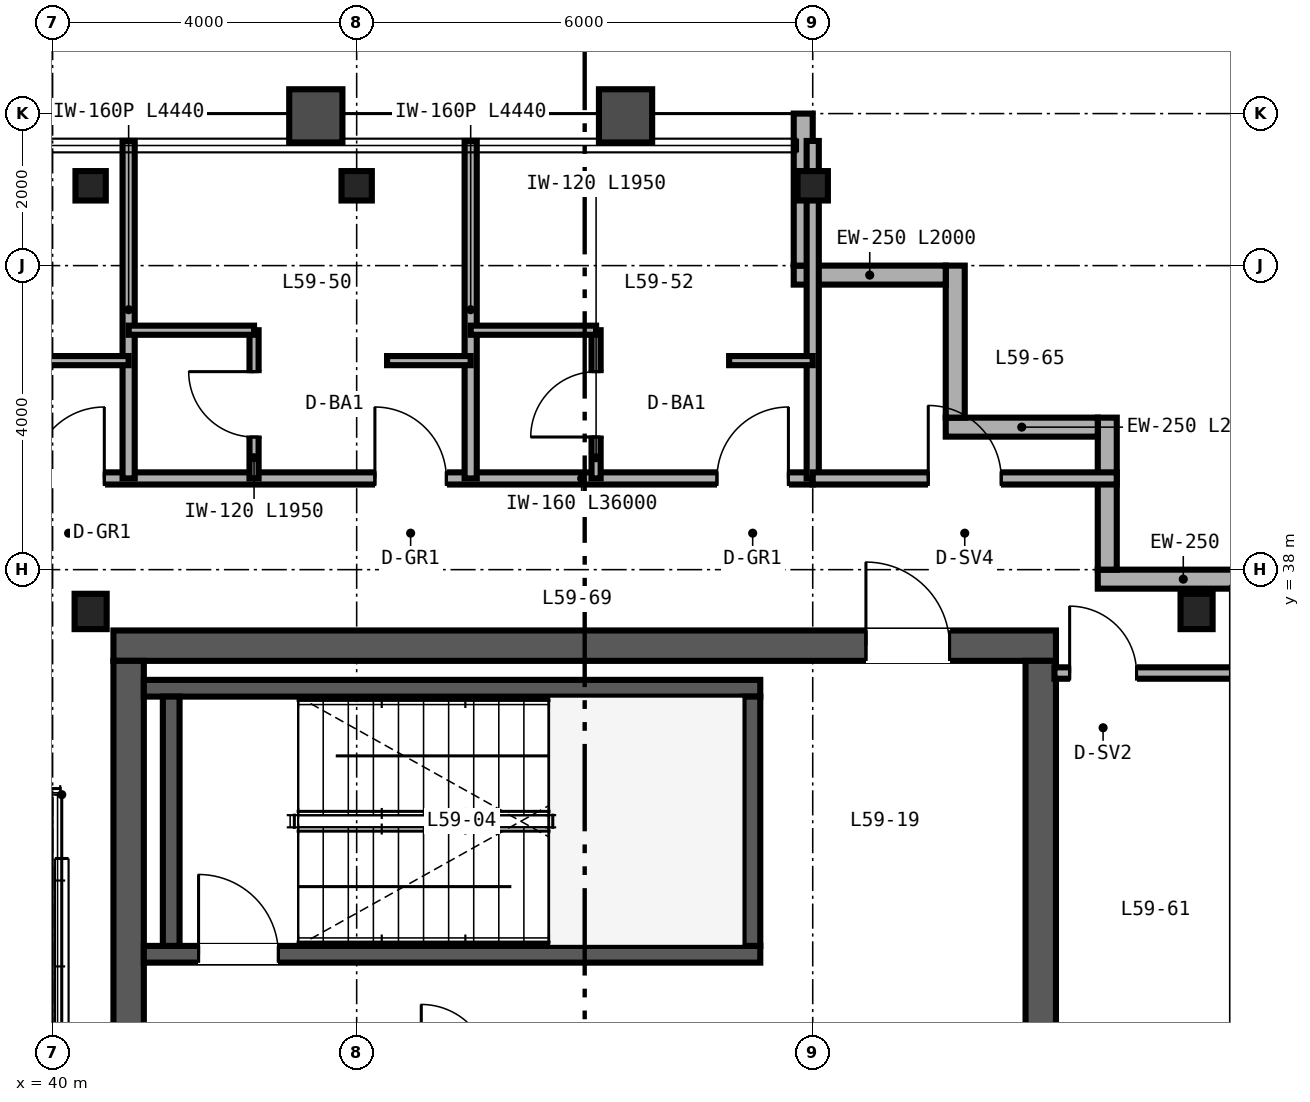
"""IFC4 building model, lengths in metres.
Left out: names, types, materials, properties, quantities, classifications, styles, units other than length and angle.
Written with IfcOpenShell. Run it as: python <this file> out.ifc"""

import sys

from ifc_helpers import new_model, si_unit, direction, frame, frame_2d, origin, origin_2d, place, context, subcontext, project, spatial, rectangle, i_section, extrude, source, transform, mapped, element, fill, save


model = new_model("IFC4")
c1 = context("Model", 3, precision=1e-05, world=origin(), true_north=direction((0.0, 1.0)))
c2 = subcontext(c1, "Body", "Model", "MODEL_VIEW")
j1 = project(units=[si_unit("LENGTHUNIT", "METRE"), si_unit("PLANEANGLEUNIT", "RADIAN")], contexts=[c1])
p1 = place(None, origin())
s1 = spatial("IfcSite", under=j1, at=p1, CompositionType="ELEMENT")
p2 = place(p1, origin())
s2 = spatial("IfcBuilding", under=s1, at=p2, CompositionType="ELEMENT")
p3 = place(p2, frame((0.0, 0.0, 236.4)))
s3 = spatial("IfcBuildingStorey", under=s2, at=p3, CompositionType="ELEMENT", Elevation=236.4)
p4 = place(p3, frame((40.8, 37.0, 0.0), z_axis=(0.0, 0.0, 1.0), x_axis=(1.0, 0.0, 0.0)))
e1 = element("IfcWall", 1, at=p4, inside=s3, PredefinedType="SHEAR", context=c2, shape_type="SweptSolid", body=[
    extrude(rectangle(XDim=12.4, YDim=0.4, at=frame_2d((6.2, 0.0))), origin(), (0.0, 0.0, 1.0), 3.38),
])
p5 = place(p4, frame((9.9, 0.0, 0.0)))
e2 = element("IfcOpeningElement", 2, at=p5, cuts=e1, PredefinedType="OPENING", context=c2, shape_type="SweptSolid", body=[
    extrude(rectangle(XDim=1.1, YDim=2.15, at=frame_2d((0.55, 1.075))), frame((0.0, 0.21, 0.0), z_axis=(0.0, -1.0, 0.0), x_axis=(1.0, 0.0, 0.0)), (0.0, 0.0, 1.0), 0.42),
])
for number, where, z_axis, x_axis in (
    (3, (41.0, 15.2, 0.0), (0.0, 0.0, 1.0), (0.0, 1.0, 0.0)),
    (4, (53.0, 15.2, 0.0), (0.0, 0.0, 1.0), (0.0, 1.0, 0.0)),
):
    element("IfcWall", number, at=place(p3, frame(where, z_axis=z_axis, x_axis=x_axis)), inside=s3, PredefinedType="SHEAR", context=c2, shape_type="SweptSolid", body=[
        extrude(rectangle(XDim=21.6, YDim=0.4, at=frame_2d((10.8, 0.0))), origin(), (0.0, 0.0, 1.0), 3.38),
    ])
p6 = place(p3, frame((41.2, 32.94, 0.0), z_axis=(0.0, 0.0, 1.0), x_axis=(1.0, 0.0, 0.0)))
e5 = element("IfcWall", 5, at=p6, inside=s3, PredefinedType="SHEAR", context=c2, shape_type="SweptSolid", body=[
    extrude(rectangle(XDim=8.11, YDim=0.22, at=frame_2d((4.055, 0.0))), origin(), (0.0, 0.0, 1.0), 3.4),
])
p7 = place(p6, frame((0.72, 0.0, 0.0)))
e6 = element("IfcOpeningElement", 6, at=p7, cuts=e5, PredefinedType="OPENING", context=c2, shape_type="SweptSolid", body=[
    extrude(rectangle(XDim=1.05, YDim=2.15, at=frame_2d((0.525, 1.075))), frame((0.0, 0.12, 0.0), z_axis=(0.0, -1.0, 0.0), x_axis=(1.0, 0.0, 0.0)), (0.0, 0.0, 1.0), 0.24),
])
p8 = place(p3, frame((41.2, 36.44, 0.0), z_axis=(0.0, 0.0, 1.0), x_axis=(1.0, 0.0, 0.0)))
e7 = element("IfcWall", 7, at=p8, inside=s3, PredefinedType="SHEAR", context=c2, shape_type="SweptSolid", body=[
    extrude(rectangle(XDim=8.11, YDim=0.22, at=frame_2d((4.055, 0.0))), origin(), (0.0, 0.0, 1.0), 3.4),
])
for number, where, z_axis, x_axis in (
    (8, (41.56, 33.05, 0.0), (0.0, 0.0, 1.0), (0.0, 1.0, 0.0)),
    (9, (49.2, 33.05, 0.0), (0.0, 0.0, 1.0), (0.0, 1.0, 0.0)),
):
    element("IfcWall", number, at=place(p3, frame(where, z_axis=z_axis, x_axis=x_axis)), inside=s3, PredefinedType="SHEAR", context=c2, shape_type="SweptSolid", body=[
        extrude(rectangle(XDim=3.28, YDim=0.22, at=frame_2d((1.64, 0.0))), origin(), (0.0, 0.0, 1.0), 3.4),
    ])
m1 = source(origin(), c2, "Body", "SweptSolid", [
    extrude(i_section(OverallWidth=0.422, OverallDepth=0.465, WebThickness=0.045, FlangeThickness=0.073, FilletRadius=0.025, at=origin_2d()), origin(), (0.0, 0.0, 1.0), 3.38),
])
for number, where, z_axis, x_axis in (
    (10, (40.5, 37.45, 0.0), (0.0, 0.0, 1.0), (1.0, 0.0, 0.0)),
    (11, (55.05, 37.45, 0.0), (0.0, 0.0, 1.0), (1.0, 0.0, 0.0)),
):
    element("IfcColumn", number, at=place(p3, frame(where, z_axis=z_axis, x_axis=x_axis)), inside=s3, PredefinedType="COLUMN", context=c2, shape_type="MappedRepresentation", body=[
        mapped(m1, transform((0.0, 0.0, 0.0), scale=1.0)),
    ])
m2 = source(origin(), c2, "Body", "SweptSolid", [
    extrude(i_section(OverallWidth=0.399, OverallDepth=0.387, WebThickness=0.021, FlangeThickness=0.033, FilletRadius=0.025, at=origin_2d()), origin(), (0.0, 0.0, 1.0), 3.38),
])
for number, where, z_axis, x_axis in (
    (12, (40.5, 43.05, 0.0), (0.0, 0.0, 1.0), (1.0, 0.0, 0.0)),
    (13, (44.0, 43.05, 0.0), (0.0, 0.0, 1.0), (1.0, 0.0, 0.0)),
    (14, (50.0, 43.05, 0.0), (0.0, 0.0, 1.0), (1.0, 0.0, 0.0)),
):
    element("IfcColumn", number, at=place(p3, frame(where, z_axis=z_axis, x_axis=x_axis)), inside=s3, PredefinedType="COLUMN", context=c2, shape_type="MappedRepresentation", body=[
        mapped(m2, transform((0.0, 0.0, 0.0), scale=1.0)),
    ])
p9 = place(p3, frame((56.0, 37.875, 0.0), z_axis=(0.0, 0.0, 1.0), x_axis=(-1.0, 0.0, 0.0)))
e15 = element("IfcWall", 15, at=p9, inside=s3, PredefinedType="SOLIDWALL", context=c2, shape_type="SweptSolid", body=[
    extrude(rectangle(XDim=2.25, YDim=0.25, at=frame_2d((1.125, 0.0))), origin(), (0.0, 0.0, 1.0), 3.38),
])
for number, where, z_axis, x_axis in (
    (16, (53.875, 38.0, 0.0), (0.0, 0.0, 1.0), (0.0, 1.0, 0.0)),
    (17, (53.75, 39.875, 0.0), (0.0, 0.0, 1.0), (-1.0, 0.0, 0.0)),
    (18, (51.875, 40.0, 0.0), (0.0, 0.0, 1.0), (0.0, 1.0, 0.0)),
    (19, (51.75, 41.875, 0.0), (0.0, 0.0, 1.0), (-1.0, 0.0, 0.0)),
):
    element("IfcWall", number, at=place(p3, frame(where, z_axis=z_axis, x_axis=x_axis)), inside=s3, PredefinedType="SOLIDWALL", context=c2, shape_type="SweptSolid", body=[
        extrude(rectangle(XDim=2.0, YDim=0.25, at=frame_2d((1.0, 0.0))), origin(), (0.0, 0.0, 1.0), 3.38),
    ])
p10 = place(p3, frame((49.875, 42.0, 0.0), z_axis=(0.0, 0.0, 1.0), x_axis=(0.0, 1.0, 0.0)))
e20 = element("IfcWall", 20, at=p10, inside=s3, PredefinedType="SOLIDWALL", context=c2, shape_type="SweptSolid", body=[
    extrude(rectangle(XDim=2.0, YDim=0.25, at=frame_2d((1.0, 0.0))), origin(), (0.0, 0.0, 1.0), 2.687),
])
p11 = place(p3, frame((14.0, 39.2, 0.0), z_axis=(0.0, 0.0, 1.0), x_axis=(1.0, 0.0, 0.0)))
e21 = element("IfcWall", 21, at=p11, inside=s3, PredefinedType="PARTITIONING", context=c2, shape_type="SweptSolid", body=[
    extrude(rectangle(XDim=36.0, YDim=0.16, at=frame_2d((18.0, 0.0))), origin(), (0.0, 0.0, 1.0), 2.923),
])
p12 = place(p11, frame((3.24, 0.0, 0.0)))
e22 = element("IfcOpeningElement", 22, at=p12, cuts=e21, PredefinedType="OPENING", context=c2, shape_type="SweptSolid", body=[
    extrude(rectangle(XDim=0.94, YDim=2.15, at=frame_2d((0.47, 1.075))), frame((0.0, 0.09, 0.0), z_axis=(0.0, -1.0, 0.0), x_axis=(1.0, 0.0, 0.0)), (0.0, 0.0, 1.0), 0.18),
])
p13 = place(p11, frame((7.74, 0.0, 0.0)))
e23 = element("IfcOpeningElement", 23, at=p13, cuts=e21, PredefinedType="OPENING", context=c2, shape_type="SweptSolid", body=[
    extrude(rectangle(XDim=0.94, YDim=2.15, at=frame_2d((0.47, 1.075))), frame((0.0, 0.09, 0.0), z_axis=(0.0, -1.0, 0.0), x_axis=(1.0, 0.0, 0.0)), (0.0, 0.0, 1.0), 0.18),
])
p14 = place(p11, frame((12.24, 0.0, 0.0)))
e24 = element("IfcOpeningElement", 24, at=p14, cuts=e21, PredefinedType="OPENING", context=c2, shape_type="SweptSolid", body=[
    extrude(rectangle(XDim=0.94, YDim=2.15, at=frame_2d((0.47, 1.075))), frame((0.0, 0.09, 0.0), z_axis=(0.0, -1.0, 0.0), x_axis=(1.0, 0.0, 0.0)), (0.0, 0.0, 1.0), 0.18),
])
p15 = place(p11, frame((16.74, 0.0, 0.0)))
e25 = element("IfcOpeningElement", 25, at=p15, cuts=e21, PredefinedType="OPENING", context=c2, shape_type="SweptSolid", body=[
    extrude(rectangle(XDim=0.94, YDim=2.15, at=frame_2d((0.47, 1.075))), frame((0.0, 0.09, 0.0), z_axis=(0.0, -1.0, 0.0), x_axis=(1.0, 0.0, 0.0)), (0.0, 0.0, 1.0), 0.18),
])
p16 = place(p11, frame((21.24, 0.0, 0.0)))
e26 = element("IfcOpeningElement", 26, at=p16, cuts=e21, PredefinedType="OPENING", context=c2, shape_type="SweptSolid", body=[
    extrude(rectangle(XDim=0.94, YDim=2.15, at=frame_2d((0.47, 1.075))), frame((0.0, 0.09, 0.0), z_axis=(0.0, -1.0, 0.0), x_axis=(1.0, 0.0, 0.0)), (0.0, 0.0, 1.0), 0.18),
])
p17 = place(p11, frame((25.74, 0.0, 0.0)))
e27 = element("IfcOpeningElement", 27, at=p17, cuts=e21, PredefinedType="OPENING", context=c2, shape_type="SweptSolid", body=[
    extrude(rectangle(XDim=0.94, YDim=2.15, at=frame_2d((0.47, 1.075))), frame((0.0, 0.09, 0.0), z_axis=(0.0, -1.0, 0.0), x_axis=(1.0, 0.0, 0.0)), (0.0, 0.0, 1.0), 0.18),
])
p18 = place(p11, frame((30.24, 0.0, 0.0)))
e28 = element("IfcOpeningElement", 28, at=p18, cuts=e21, PredefinedType="OPENING", context=c2, shape_type="SweptSolid", body=[
    extrude(rectangle(XDim=0.94, YDim=2.15, at=frame_2d((0.47, 1.075))), frame((0.0, 0.09, 0.0), z_axis=(0.0, -1.0, 0.0), x_axis=(1.0, 0.0, 0.0)), (0.0, 0.0, 1.0), 0.18),
])
p19 = place(p11, frame((34.74, 0.0, 0.0)))
e29 = element("IfcOpeningElement", 29, at=p19, cuts=e21, PredefinedType="OPENING", context=c2, shape_type="SweptSolid", body=[
    extrude(rectangle(XDim=0.94, YDim=2.15, at=frame_2d((0.47, 1.075))), frame((0.0, 0.09, 0.0), z_axis=(0.0, -1.0, 0.0), x_axis=(1.0, 0.0, 0.0)), (0.0, 0.0, 1.0), 0.18),
])
p20 = place(p3, frame((50.0, 39.2, 0.0), z_axis=(0.0, 0.0, 1.0), x_axis=(0.0, 1.0, 0.0)))
e30 = element("IfcWall", 30, at=p20, inside=s3, PredefinedType="PARTITIONING", context=c2, shape_type="SweptSolid", body=[
    extrude(rectangle(XDim=4.44, YDim=0.16, at=frame_2d((2.22, 0.0))), origin(), (0.0, 0.0, 1.0), 2.687),
])
p21 = place(p3, frame((41.0, 39.2, 0.0), z_axis=(0.0, 0.0, 1.0), x_axis=(0.0, 1.0, 0.0)))
e31 = element("IfcWall", 31, at=p21, inside=s3, PredefinedType="PARTITIONING", context=c2, shape_type="SweptSolid", body=[
    extrude(rectangle(XDim=4.44, YDim=0.16, at=frame_2d((2.22, 0.0))), origin(), (0.0, 0.0, 1.0), 2.843),
])
p22 = place(p3, frame((39.9, 40.75, 0.0), z_axis=(0.0, 0.0, 1.0), x_axis=(1.0, 0.0, 0.0)))
e32 = element("IfcWall", 32, at=p22, inside=s3, PredefinedType="PARTITIONING", context=c2, shape_type="SweptSolid", body=[
    extrude(rectangle(XDim=1.1, YDim=0.12, at=frame_2d((0.55, 0.0))), origin(), (0.0, 0.0, 1.0), 2.923),
])
p23 = place(p3, frame((45.5, 39.2, 0.0), z_axis=(0.0, 0.0, 1.0), x_axis=(0.0, 1.0, 0.0)))
e33 = element("IfcWall", 33, at=p23, inside=s3, PredefinedType="PARTITIONING", context=c2, shape_type="SweptSolid", body=[
    extrude(rectangle(XDim=4.44, YDim=0.16, at=frame_2d((2.22, 0.0))), origin(), (0.0, 0.0, 1.0), 2.687),
])
p24 = place(p3, frame((42.65, 39.2, 0.0), z_axis=(0.0, 0.0, 1.0), x_axis=(0.0, 1.0, 0.0)))
e34 = element("IfcWall", 34, at=p24, inside=s3, PredefinedType="PARTITIONING", context=c2, shape_type="SweptSolid", body=[
    extrude(rectangle(XDim=1.95, YDim=0.12, at=frame_2d((0.975, 0.0))), origin(), (0.0, 0.0, 1.0), 3.38),
])
p25 = place(p24, frame((0.545, 0.0, 0.0)))
e35 = element("IfcOpeningElement", 35, at=p25, cuts=e34, PredefinedType="OPENING", context=c2, shape_type="SweptSolid", body=[
    extrude(rectangle(XDim=0.86, YDim=2.1, at=frame_2d((0.43, 1.05))), frame((0.0, 0.07, 0.0), z_axis=(0.0, -1.0, 0.0), x_axis=(1.0, 0.0, 0.0)), (0.0, 0.0, 1.0), 0.14),
])
p26 = place(p3, frame((41.0, 41.15, 0.0), z_axis=(0.0, 0.0, 1.0), x_axis=(1.0, 0.0, 0.0)))
e36 = element("IfcWall", 36, at=p26, inside=s3, PredefinedType="PARTITIONING", context=c2, shape_type="SweptSolid", body=[
    extrude(rectangle(XDim=1.65, YDim=0.12, at=frame_2d((0.825, 0.0))), origin(), (0.0, 0.0, 1.0), 3.38),
])
p27 = place(p3, frame((44.4, 40.75, 0.0), z_axis=(0.0, 0.0, 1.0), x_axis=(1.0, 0.0, 0.0)))
e37 = element("IfcWall", 37, at=p27, inside=s3, PredefinedType="PARTITIONING", context=c2, shape_type="SweptSolid", body=[
    extrude(rectangle(XDim=1.1, YDim=0.12, at=frame_2d((0.55, 0.0))), origin(), (0.0, 0.0, 1.0), 3.38),
])
p28 = place(p3, frame((47.15, 39.2, 0.0), z_axis=(0.0, 0.0, 1.0), x_axis=(0.0, 1.0, 0.0)))
e38 = element("IfcWall", 38, at=p28, inside=s3, PredefinedType="PARTITIONING", context=c2, shape_type="SweptSolid", body=[
    extrude(rectangle(XDim=1.95, YDim=0.12, at=frame_2d((0.975, 0.0))), origin(), (0.0, 0.0, 1.0), 3.38),
])
p29 = place(p28, frame((0.545, 0.0, 0.0)))
e39 = element("IfcOpeningElement", 39, at=p29, cuts=e38, PredefinedType="OPENING", context=c2, shape_type="SweptSolid", body=[
    extrude(rectangle(XDim=0.86, YDim=2.1, at=frame_2d((0.43, 1.05))), frame((0.0, 0.07, 0.0), z_axis=(0.0, -1.0, 0.0), x_axis=(1.0, 0.0, 0.0)), (0.0, 0.0, 1.0), 0.14),
])
p30 = place(p3, frame((45.5, 41.15, 0.0), z_axis=(0.0, 0.0, 1.0), x_axis=(1.0, 0.0, 0.0)))
e40 = element("IfcWall", 40, at=p30, inside=s3, PredefinedType="PARTITIONING", context=c2, shape_type="SweptSolid", body=[
    extrude(rectangle(XDim=1.65, YDim=0.12, at=frame_2d((0.825, 0.0))), origin(), (0.0, 0.0, 1.0), 3.38),
])
p31 = place(p3, frame((48.9, 40.75, 0.0), z_axis=(0.0, 0.0, 1.0), x_axis=(1.0, 0.0, 0.0)))
e41 = element("IfcWall", 41, at=p31, inside=s3, PredefinedType="PARTITIONING", context=c2, shape_type="SweptSolid", body=[
    extrude(rectangle(XDim=1.1, YDim=0.12, at=frame_2d((0.55, 0.0))), origin(), (0.0, 0.0, 1.0), 3.38),
])
p32 = place(p3, frame((53.18, 36.64, 0.0), z_axis=(0.0, 0.0, 1.0), x_axis=(1.0, 0.0, 0.0)))
e42 = element("IfcWall", 42, at=p32, inside=s3, PredefinedType="PARTITIONING", context=c2, shape_type="SweptSolid", body=[
    extrude(rectangle(XDim=2.66, YDim=0.15, at=frame_2d((1.33, 0.0))), origin(), (0.0, 0.0, 1.0), 2.763),
])
p33 = place(p32, frame((0.2, 0.0, 0.0)))
e43 = element("IfcOpeningElement", 43, at=p33, cuts=e42, PredefinedType="OPENING", context=c2, shape_type="SweptSolid", body=[
    extrude(rectangle(XDim=0.88, YDim=2.15, at=frame_2d((0.44, 1.075))), frame((0.0, 0.085, 0.0), z_axis=(0.0, -1.0, 0.0), x_axis=(1.0, 0.0, 0.0)), (0.0, 0.0, 1.0), 0.17),
])
p34 = place(p3, frame((50.0, 39.2, 0.0), z_axis=(0.0, 0.0, 1.0), x_axis=(1.0, 0.0, 0.0)))
e44 = element("IfcWall", 44, at=p34, inside=s3, PredefinedType="PARTITIONING", context=c2, shape_type="SweptSolid", body=[
    extrude(rectangle(XDim=4.0, YDim=0.16, at=frame_2d((2.0, 0.0))), origin(), (0.0, 0.0, 1.0), 3.38),
])
p35 = place(p34, frame((1.52, 0.0, 0.0)))
e45 = element("IfcOpeningElement", 45, at=p35, cuts=e44, PredefinedType="OPENING", context=c2, shape_type="SweptSolid", body=[
    extrude(rectangle(XDim=0.96, YDim=2.15, at=frame_2d((0.48, 1.075))), frame((0.0, 0.09, 0.0), z_axis=(0.0, -1.0, 0.0), x_axis=(1.0, 0.0, 0.0)), (0.0, 0.0, 1.0), 0.18),
])
m3 = source(origin(), c2, "Body", "SweptSolid", [
    extrude(rectangle(XDim=1.05, YDim=2.15, at=frame_2d((0.525, 1.075))), frame((0.0, 0.025, 0.0), z_axis=(0.0, -1.0, 0.0), x_axis=(1.0, 0.0, 0.0)), (0.0, 0.0, 1.0), 0.05),
])
p36 = place(p7, origin())
e46 = element("IfcDoor", 46, at=p36, inside=s3, OperationType="SINGLE_SWING_LEFT", PredefinedType="DOOR", context=c2, shape_type="MappedRepresentation", body=[
    mapped(m3, transform((0.0, 0.0, 0.0), scale=1.0)),
])
fill(e6, e46)
m4 = source(origin(), c2, "Body", "SweptSolid", [
    extrude(rectangle(XDim=1.1, YDim=2.15, at=frame_2d((0.55, 1.075))), frame((0.0, 0.025, 0.0), z_axis=(0.0, -1.0, 0.0), x_axis=(1.0, 0.0, 0.0)), (0.0, 0.0, 1.0), 0.05),
])
p37 = place(p5, origin())
e47 = element("IfcDoor", 47, at=p37, inside=s3, OperationType="SINGLE_SWING_LEFT", PredefinedType="DOOR", context=c2, shape_type="MappedRepresentation", body=[
    mapped(m4, transform((0.0, 0.0, 0.0), scale=1.0)),
])
fill(e2, e47)
m5 = source(origin(), c2, "Body", "SweptSolid", [
    extrude(rectangle(XDim=0.86, YDim=2.1, at=frame_2d((0.43, 1.05))), frame((0.0, 0.025, 0.0), z_axis=(0.0, -1.0, 0.0), x_axis=(1.0, 0.0, 0.0)), (0.0, 0.0, 1.0), 0.05),
])
p38 = place(p25, origin())
e48 = element("IfcDoor", 48, at=p38, inside=s3, OperationType="SINGLE_SWING_RIGHT", PredefinedType="DOOR", context=c2, shape_type="MappedRepresentation", body=[
    mapped(m5, transform((0.0, 0.0, 0.0), scale=1.0)),
])
fill(e35, e48)
p39 = place(p29, origin())
e49 = element("IfcDoor", 49, at=p39, inside=s3, OperationType="SINGLE_SWING_LEFT", PredefinedType="DOOR", context=c2, shape_type="MappedRepresentation", body=[
    mapped(m5, transform((0.0, 0.0, 0.0), scale=1.0)),
])
fill(e39, e49)
m6 = source(origin(), c2, "Body", "SweptSolid", [
    extrude(rectangle(XDim=0.94, YDim=2.15, at=frame_2d((0.47, 1.075))), frame((0.0, 0.025, 0.0), z_axis=(0.0, -1.0, 0.0), x_axis=(1.0, 0.0, 0.0)), (0.0, 0.0, 1.0), 0.05),
])
p40 = place(p17, origin())
e50 = element("IfcDoor", 50, at=p40, inside=s3, OperationType="SINGLE_SWING_RIGHT", PredefinedType="DOOR", context=c2, shape_type="MappedRepresentation", body=[
    mapped(m6, transform((0.0, 0.0, 0.0), scale=1.0)),
])
fill(e27, e50)
p41 = place(p18, origin())
e51 = element("IfcDoor", 51, at=p41, inside=s3, OperationType="SINGLE_SWING_LEFT", PredefinedType="DOOR", context=c2, shape_type="MappedRepresentation", body=[
    mapped(m6, transform((0.0, 0.0, 0.0), scale=1.0)),
])
fill(e28, e51)
p42 = place(p19, origin())
e52 = element("IfcDoor", 52, at=p42, inside=s3, OperationType="SINGLE_SWING_RIGHT", PredefinedType="DOOR", context=c2, shape_type="MappedRepresentation", body=[
    mapped(m6, transform((0.0, 0.0, 0.0), scale=1.0)),
])
fill(e29, e52)
m7 = source(origin(), c2, "Body", "SweptSolid", [
    extrude(rectangle(XDim=0.88, YDim=2.15, at=frame_2d((0.44, 1.075))), frame((0.0, 0.025, 0.0), z_axis=(0.0, -1.0, 0.0), x_axis=(1.0, 0.0, 0.0)), (0.0, 0.0, 1.0), 0.05),
])
p43 = place(p33, origin())
e53 = element("IfcDoor", 53, at=p43, inside=s3, OperationType="SINGLE_SWING_LEFT", PredefinedType="DOOR", context=c2, shape_type="MappedRepresentation", body=[
    mapped(m7, transform((0.0, 0.0, 0.0), scale=1.0)),
])
fill(e43, e53)
m8 = source(origin(), c2, "Body", "SweptSolid", [
    extrude(rectangle(XDim=0.96, YDim=2.15, at=frame_2d((0.48, 1.075))), frame((0.0, 0.025, 0.0), z_axis=(0.0, -1.0, 0.0), x_axis=(1.0, 0.0, 0.0)), (0.0, 0.0, 1.0), 0.05),
])
p44 = place(p35, origin())
e54 = element("IfcDoor", 54, at=p44, inside=s3, OperationType="SINGLE_SWING_LEFT", PredefinedType="DOOR", context=c2, shape_type="MappedRepresentation", body=[
    mapped(m8, transform((0.0, 0.0, 0.0), scale=1.0)),
])
fill(e45, e54)
save(model, sys.argv[1])
